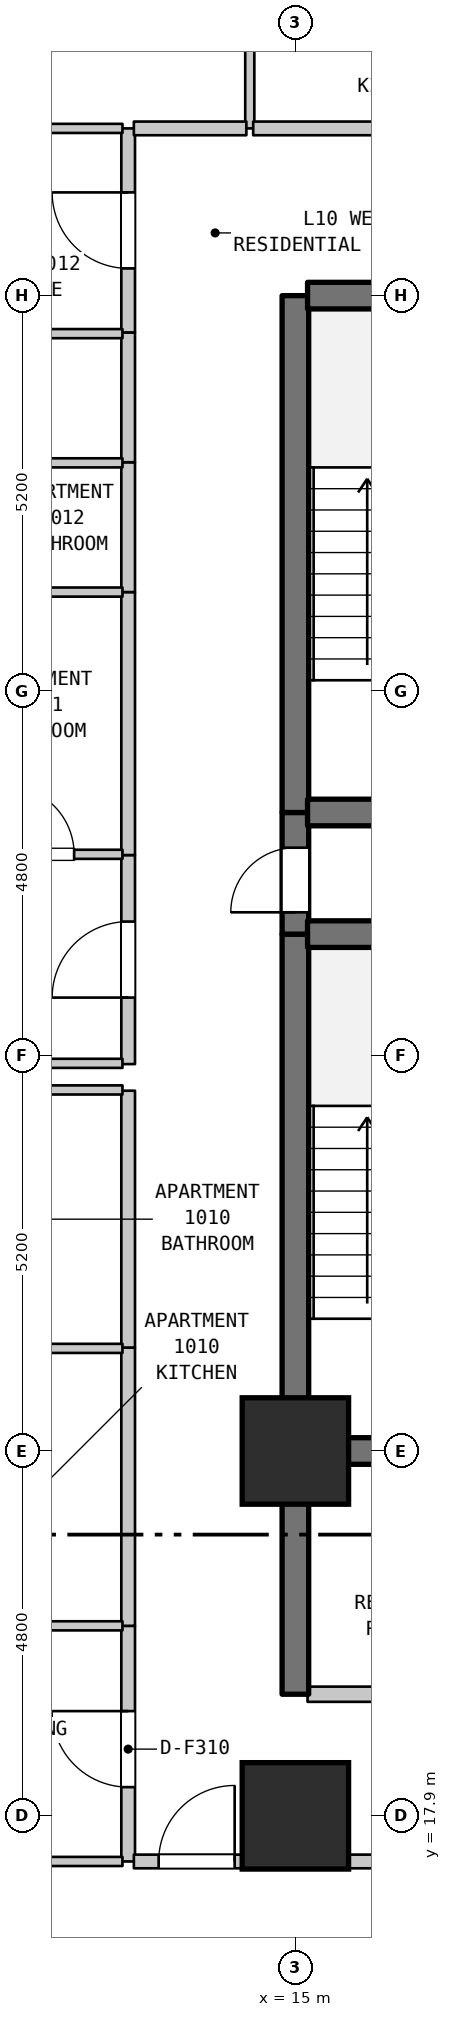
"""IFC4 building model, lengths in metres.
Left out: names, types, materials, properties, quantities, classifications, styles, units other than length and angle.
Written with IfcOpenShell. Run it as: python <this file> out.ifc"""

import sys

from ifc_helpers import new_model, si_unit, direction, frame, frame_2d, origin, origin_2d, place, context, subcontext, project, spatial, rectangle, extrude, element, fill, save


model = new_model("IFC4")
c1 = context("Model", 3, precision=1e-05, world=origin(), true_north=direction((0.0, 1.0)))
c2 = subcontext(c1, "Body", "Model", "MODEL_VIEW")
j1 = project(units=[si_unit("LENGTHUNIT", "METRE"), si_unit("PLANEANGLEUNIT", "RADIAN")], contexts=[c1])
p1 = place(None, origin())
s1 = spatial("IfcSite", under=j1, at=p1, CompositionType="ELEMENT")
p2 = place(p1, origin())
s2 = spatial("IfcBuilding", under=s1, at=p2, CompositionType="ELEMENT")
p3 = place(p2, frame((0.0, 0.0, 46.2)))
s3 = spatial("IfcBuildingStorey", under=s2, at=p3, CompositionType="ELEMENT", Elevation=46.2)
for number, where, z_axis, x_axis in (
    (1, (15.0, 17.9, 0.0), (0.0, 0.0, 1.0), (1.0, 0.0, 0.0)),
    (2, (15.0, 22.7, 0.0), (0.0, 0.0, 1.0), (1.0, 0.0, 0.0)),
):
    element("IfcColumn", number, at=place(p3, frame(where, z_axis=z_axis, x_axis=x_axis)), inside=s3, PredefinedType="COLUMN", context=c2, shape_type="SweptSolid", body=[
        extrude(rectangle(XDim=1.4, YDim=1.4, at=origin_2d()), origin(), (0.0, 0.0, 1.0), 3.7),
    ])
p4 = place(p3, frame((12.8, 17.3, 0.0), z_axis=(0.0, 0.0, 1.0), x_axis=(0.0, 1.0, 0.0)))
e3 = element("IfcWall", 3, at=p4, inside=s3, PredefinedType="STANDARD", context=c2, shape_type="SweptSolid", body=[
    extrude(rectangle(XDim=3.1, YDim=0.18, at=frame_2d((1.55, 0.0))), origin(), (0.0, 0.0, 1.0), 3.385),
])
p5 = place(p4, frame((0.978, 0.0, 0.0)))
e4 = element("IfcOpeningElement", 4, at=p5, cuts=e3, PredefinedType="OPENING", context=c2, shape_type="SweptSolid", body=[
    extrude(rectangle(XDim=1.0, YDim=2.15, at=frame_2d((0.5, 1.075))), frame((0.0, 0.1, 0.0), z_axis=(0.0, -1.0, 0.0), x_axis=(1.0, 0.0, 0.0)), (0.0, 0.0, 1.0), 0.2),
])
p6 = place(p3, frame((12.8, 20.4, 0.0), z_axis=(0.0, 0.0, 1.0), x_axis=(0.0, 1.0, 0.0)))
e5 = element("IfcWall", 5, at=p6, inside=s3, PredefinedType="STANDARD", context=c2, shape_type="SweptSolid", body=[
    extrude(rectangle(XDim=3.661, YDim=0.18, at=frame_2d((1.831, 0.0))), origin(), (0.0, 0.0, 1.0), 3.385),
])
p7 = place(p3, frame((12.8, 24.061, 0.0), z_axis=(0.0, 0.0, 1.0), x_axis=(0.0, 1.0, 0.0)))
e6 = element("IfcWall", 6, at=p7, inside=s3, PredefinedType="STANDARD", context=c2, shape_type="SweptSolid", body=[
    extrude(rectangle(XDim=3.379, YDim=0.18, at=frame_2d((1.689, 0.0))), origin(), (0.0, 0.0, 1.0), 3.385),
])
p8 = place(p3, frame((12.8, 27.79, 0.0), z_axis=(0.0, 0.0, 1.0), x_axis=(0.0, 1.0, 0.0)))
e7 = element("IfcWall", 7, at=p8, inside=s3, PredefinedType="STANDARD", context=c2, shape_type="SweptSolid", body=[
    extrude(rectangle(XDim=2.75, YDim=0.18, at=frame_2d((1.375, 0.0))), origin(), (0.0, 0.0, 1.0), 3.385),
])
p9 = place(p8, frame((0.875, 0.0, 0.0)))
e8 = element("IfcOpeningElement", 8, at=p9, cuts=e7, PredefinedType="OPENING", context=c2, shape_type="SweptSolid", body=[
    extrude(rectangle(XDim=1.0, YDim=2.15, at=frame_2d((0.5, 1.075))), frame((0.0, 0.1, 0.0), z_axis=(0.0, -1.0, 0.0), x_axis=(1.0, 0.0, 0.0)), (0.0, 0.0, 1.0), 0.2),
])
p10 = place(p3, frame((12.8, 30.54, 0.0), z_axis=(0.0, 0.0, 1.0), x_axis=(0.0, 1.0, 0.0)))
e9 = element("IfcWall", 9, at=p10, inside=s3, PredefinedType="STANDARD", context=c2, shape_type="SweptSolid", body=[
    extrude(rectangle(XDim=3.46, YDim=0.18, at=frame_2d((1.73, 0.0))), origin(), (0.0, 0.0, 1.0), 3.385),
])
for number, where, z_axis, x_axis in (
    (10, (12.8, 34.0, 0.0), (0.0, 0.0, 1.0), (0.0, 1.0, 0.0)),
    (11, (12.8, 35.708, 0.0), (0.0, 0.0, 1.0), (0.0, 1.0, 0.0)),
):
    element("IfcWall", number, at=place(p3, frame(where, z_axis=z_axis, x_axis=x_axis)), inside=s3, PredefinedType="STANDARD", context=c2, shape_type="SweptSolid", body=[
        extrude(rectangle(XDim=1.708, YDim=0.18, at=frame_2d((0.854, 0.0))), origin(), (0.0, 0.0, 1.0), 3.385),
    ])
p11 = place(p3, frame((12.8, 37.416, 0.0), z_axis=(0.0, 0.0, 1.0), x_axis=(0.0, 1.0, 0.0)))
e12 = element("IfcWall", 12, at=p11, inside=s3, PredefinedType="STANDARD", context=c2, shape_type="SweptSolid", body=[
    extrude(rectangle(XDim=2.684, YDim=0.18, at=frame_2d((1.342, 0.0))), origin(), (0.0, 0.0, 1.0), 3.385),
])
p12 = place(p11, frame((0.842, 0.0, 0.0)))
e13 = element("IfcOpeningElement", 13, at=p12, cuts=e12, PredefinedType="OPENING", context=c2, shape_type="SweptSolid", body=[
    extrude(rectangle(XDim=1.0, YDim=2.15, at=frame_2d((0.5, 1.075))), frame((0.0, 0.1, 0.0), z_axis=(0.0, -1.0, 0.0), x_axis=(1.0, 0.0, 0.0)), (0.0, 0.0, 1.0), 0.2),
])
p13 = place(p3, frame((14.4, 40.1, 0.0), z_axis=(0.0, 0.0, 1.0), x_axis=(0.0, 1.0, 0.0)))
e14 = element("IfcWall", 14, at=p13, inside=s3, PredefinedType="PARTITIONING", context=c2, shape_type="SweptSolid", body=[
    extrude(rectangle(XDim=2.3, YDim=0.12, at=frame_2d((1.15, 0.0))), origin(), (0.0, 0.0, 1.0), 3.385),
])
p14 = place(p3, frame((15.0, 19.5, 0.0), z_axis=(0.0, 0.0, 1.0), x_axis=(0.0, 1.0, 0.0)))
e15 = element("IfcWall", 15, at=p14, inside=s3, PredefinedType="SHEAR", context=c2, shape_type="SweptSolid", body=[
    extrude(rectangle(XDim=3.2, YDim=0.35, at=frame_2d((1.6, 0.0))), origin(), (0.0, 0.0, 1.0), 3.385),
])
p15 = place(p3, frame((15.0, 22.7, 0.0), z_axis=(0.0, 0.0, 1.0), x_axis=(0.0, 1.0, 0.0)))
e16 = element("IfcWall", 16, at=p15, inside=s3, PredefinedType="SHEAR", context=c2, shape_type="SweptSolid", body=[
    extrude(rectangle(XDim=6.8, YDim=0.35, at=frame_2d((3.4, 0.0))), origin(), (0.0, 0.0, 1.0), 3.385),
])
p16 = place(p3, frame((15.0, 29.5, 0.0), z_axis=(0.0, 0.0, 1.0), x_axis=(0.0, 1.0, 0.0)))
e17 = element("IfcWall", 17, at=p16, inside=s3, PredefinedType="SHEAR", context=c2, shape_type="SweptSolid", body=[
    extrude(rectangle(XDim=1.6, YDim=0.35, at=frame_2d((0.8, 0.0))), origin(), (0.0, 0.0, 1.0), 3.385),
])
p17 = place(p16, frame((0.287, 0.0, 0.0)))
e18 = element("IfcOpeningElement", 18, at=p17, cuts=e17, PredefinedType="OPENING", context=c2, shape_type="SweptSolid", body=[
    extrude(rectangle(XDim=0.85, YDim=2.1, at=frame_2d((0.425, 1.05))), frame((0.0, 0.185, 0.0), z_axis=(0.0, -1.0, 0.0), x_axis=(1.0, 0.0, 0.0)), (0.0, 0.0, 1.0), 0.37),
])
p18 = place(p3, frame((15.0, 31.1, 0.0), z_axis=(0.0, 0.0, 1.0), x_axis=(0.0, 1.0, 0.0)))
e19 = element("IfcWall", 19, at=p18, inside=s3, PredefinedType="SHEAR", context=c2, shape_type="SweptSolid", body=[
    extrude(rectangle(XDim=6.8, YDim=0.35, at=frame_2d((3.4, 0.0))), origin(), (0.0, 0.0, 1.0), 3.385),
])
p19 = place(p3, frame((9.085, 17.3, 0.0), z_axis=(0.0, 0.0, 1.0), x_axis=(1.0, 0.0, 0.0)))
e20 = element("IfcWall", 20, at=p19, inside=s3, PredefinedType="PARTITIONING", context=c2, shape_type="SweptSolid", body=[
    extrude(rectangle(XDim=3.64, YDim=0.12, at=frame_2d((1.82, 0.0))), origin(), (0.0, 0.0, 1.0), 3.385),
])
p20 = place(p3, frame((12.875, 17.3, 0.0), z_axis=(0.0, 0.0, 1.0), x_axis=(1.0, 0.0, 0.0)))
e21 = element("IfcWall", 21, at=p20, inside=s3, PredefinedType="STANDARD", context=c2, shape_type="SweptSolid", body=[
    extrude(rectangle(XDim=3.28, YDim=0.18, at=frame_2d((1.64, 0.0))), origin(), (0.0, 0.0, 1.0), 3.385),
])
p21 = place(p20, frame((0.326, 0.0, 0.0)))
e22 = element("IfcOpeningElement", 22, at=p21, cuts=e21, PredefinedType="OPENING", context=c2, shape_type="SweptSolid", body=[
    extrude(rectangle(XDim=1.0, YDim=2.15, at=frame_2d((0.5, 1.075))), frame((0.0, 0.1, 0.0), z_axis=(0.0, -1.0, 0.0), x_axis=(1.0, 0.0, 0.0)), (0.0, 0.0, 1.0), 0.2),
])
p22 = place(p3, frame((15.16, 19.5, 0.0), z_axis=(0.0, 0.0, 1.0), x_axis=(1.0, 0.0, 0.0)))
e23 = element("IfcWall", 23, at=p22, inside=s3, PredefinedType="STANDARD", context=c2, shape_type="SweptSolid", body=[
    extrude(rectangle(XDim=3.68, YDim=0.2, at=frame_2d((1.84, 0.0))), origin(), (0.0, 0.0, 1.0), 3.385),
])
p23 = place(p22, frame((1.39, 0.0, 0.0)))
e24 = element("IfcOpeningElement", 24, at=p23, cuts=e23, PredefinedType="OPENING", context=c2, shape_type="SweptSolid", body=[
    extrude(rectangle(XDim=0.9, YDim=2.15, at=frame_2d((0.45, 1.075))), frame((0.0, 0.11, 0.0), z_axis=(0.0, -1.0, 0.0), x_axis=(1.0, 0.0, 0.0)), (0.0, 0.0, 1.0), 0.22),
])
p24 = place(p3, frame((10.595, 20.4, 0.0), z_axis=(0.0, 0.0, 1.0), x_axis=(1.0, 0.0, 0.0)))
e25 = element("IfcWall", 25, at=p24, inside=s3, PredefinedType="PARTITIONING", context=c2, shape_type="SweptSolid", body=[
    extrude(rectangle(XDim=2.13, YDim=0.12, at=frame_2d((1.065, 0.0))), origin(), (0.0, 0.0, 1.0), 3.385),
])
p25 = place(p3, frame((15.16, 22.7, 0.0), z_axis=(0.0, 0.0, 1.0), x_axis=(1.0, 0.0, 0.0)))
e26 = element("IfcWall", 26, at=p25, inside=s3, PredefinedType="SHEAR", context=c2, shape_type="SweptSolid", body=[
    extrude(rectangle(XDim=3.68, YDim=0.35, at=frame_2d((1.84, 0.0))), origin(), (0.0, 0.0, 1.0), 3.385),
])
for number, where, z_axis, x_axis in (
    (27, (10.595, 24.05, 0.0), (0.0, 0.0, 1.0), (1.0, 0.0, 0.0)),
    (28, (10.595, 27.45, 0.0), (0.0, 0.0, 1.0), (1.0, 0.0, 0.0)),
):
    element("IfcWall", number, at=place(p3, frame(where, z_axis=z_axis, x_axis=x_axis)), inside=s3, PredefinedType="PARTITIONING", context=c2, shape_type="SweptSolid", body=[
        extrude(rectangle(XDim=2.13, YDim=0.12, at=frame_2d((1.065, 0.0))), origin(), (0.0, 0.0, 1.0), 3.385),
    ])
p26 = place(p3, frame((9.03, 27.8, 0.0), z_axis=(0.0, 0.0, 1.0), x_axis=(1.0, 0.0, 0.0)))
e29 = element("IfcWall", 29, at=p26, inside=s3, PredefinedType="PARTITIONING", context=c2, shape_type="SweptSolid", body=[
    extrude(rectangle(XDim=3.695, YDim=0.12, at=frame_2d((1.848, 0.0))), origin(), (0.0, 0.0, 1.0), 3.385),
])
p27 = place(p3, frame((15.16, 29.5, 0.0), z_axis=(0.0, 0.0, 1.0), x_axis=(1.0, 0.0, 0.0)))
e30 = element("IfcWall", 30, at=p27, inside=s3, PredefinedType="SHEAR", context=c2, shape_type="SweptSolid", body=[
    extrude(rectangle(XDim=3.68, YDim=0.35, at=frame_2d((1.84, 0.0))), origin(), (0.0, 0.0, 1.0), 3.385),
])
p28 = place(p3, frame((10.523, 30.55, 0.0), z_axis=(0.0, 0.0, 1.0), x_axis=(1.0, 0.0, 0.0)))
e31 = element("IfcWall", 31, at=p28, inside=s3, PredefinedType="PARTITIONING", context=c2, shape_type="SweptSolid", body=[
    extrude(rectangle(XDim=2.202, YDim=0.12, at=frame_2d((1.101, 0.0))), origin(), (0.0, 0.0, 1.0), 3.385),
])
p29 = place(p28, frame((0.666, 0.0, 0.0)))
e32 = element("IfcOpeningElement", 32, at=p29, cuts=e31, PredefinedType="OPENING", context=c2, shape_type="SweptSolid", body=[
    extrude(rectangle(XDim=0.9, YDim=2.1, at=frame_2d((0.45, 1.05))), frame((0.0, 0.07, 0.0), z_axis=(0.0, -1.0, 0.0), x_axis=(1.0, 0.0, 0.0)), (0.0, 0.0, 1.0), 0.14),
])
p30 = place(p3, frame((15.16, 31.1, 0.0), z_axis=(0.0, 0.0, 1.0), x_axis=(1.0, 0.0, 0.0)))
e33 = element("IfcWall", 33, at=p30, inside=s3, PredefinedType="SHEAR", context=c2, shape_type="SweptSolid", body=[
    extrude(rectangle(XDim=3.68, YDim=0.35, at=frame_2d((1.84, 0.0))), origin(), (0.0, 0.0, 1.0), 3.385),
])
for number, where, z_axis, x_axis in (
    (34, (10.545, 34.0, 0.0), (0.0, 0.0, 1.0), (1.0, 0.0, 0.0)),
    (35, (10.545, 35.7, 0.0), (0.0, 0.0, 1.0), (1.0, 0.0, 0.0)),
    (36, (10.545, 37.4, 0.0), (0.0, 0.0, 1.0), (1.0, 0.0, 0.0)),
):
    element("IfcWall", number, at=place(p3, frame(where, z_axis=z_axis, x_axis=x_axis)), inside=s3, PredefinedType="PARTITIONING", context=c2, shape_type="SweptSolid", body=[
        extrude(rectangle(XDim=2.18, YDim=0.12, at=frame_2d((1.09, 0.0))), origin(), (0.0, 0.0, 1.0), 3.385),
    ])
p31 = place(p3, frame((15.16, 37.9, 0.0), z_axis=(0.0, 0.0, 1.0), x_axis=(1.0, 0.0, 0.0)))
e37 = element("IfcWall", 37, at=p31, inside=s3, PredefinedType="SHEAR", context=c2, shape_type="SweptSolid", body=[
    extrude(rectangle(XDim=3.68, YDim=0.35, at=frame_2d((1.84, 0.0))), origin(), (0.0, 0.0, 1.0), 3.385),
])
p32 = place(p3, frame((9.702, 40.1, 0.0), z_axis=(0.0, 0.0, 1.0), x_axis=(1.0, 0.0, 0.0)))
e38 = element("IfcWall", 38, at=p32, inside=s3, PredefinedType="PARTITIONING", context=c2, shape_type="SweptSolid", body=[
    extrude(rectangle(XDim=3.023, YDim=0.12, at=frame_2d((1.512, 0.0))), origin(), (0.0, 0.0, 1.0), 3.385),
])
p33 = place(p3, frame((12.875, 40.1, 0.0), z_axis=(0.0, 0.0, 1.0), x_axis=(1.0, 0.0, 0.0)))
e39 = element("IfcWall", 39, at=p33, inside=s3, PredefinedType="STANDARD", context=c2, shape_type="SweptSolid", body=[
    extrude(rectangle(XDim=1.48, YDim=0.18, at=frame_2d((0.74, 0.0))), origin(), (0.0, 0.0, 1.0), 3.385),
])
p34 = place(p3, frame((14.445, 40.1, 0.0), z_axis=(0.0, 0.0, 1.0), x_axis=(1.0, 0.0, 0.0)))
e40 = element("IfcWall", 40, at=p34, inside=s3, PredefinedType="STANDARD", context=c2, shape_type="SweptSolid", body=[
    extrude(rectangle(XDim=2.96, YDim=0.18, at=frame_2d((1.48, 0.0))), origin(), (0.0, 0.0, 1.0), 3.385),
])
p35 = place(p5, origin())
e41 = element("IfcDoor", 41, at=p35, inside=s3, OperationType="SINGLE_SWING_RIGHT", PredefinedType="DOOR", context=c2, shape_type="SweptSolid", body=[
    extrude(rectangle(XDim=1.0, YDim=2.15, at=frame_2d((0.5, 1.075))), frame((0.0, 0.025, 0.0), z_axis=(0.0, -1.0, 0.0), x_axis=(1.0, 0.0, 0.0)), (0.0, 0.0, 1.0), 0.05),
])
fill(e4, e41)
p36 = place(p9, origin())
e42 = element("IfcDoor", 42, at=p36, inside=s3, OperationType="SINGLE_SWING_LEFT", PredefinedType="DOOR", context=c2, shape_type="SweptSolid", body=[
    extrude(rectangle(XDim=1.0, YDim=2.15, at=frame_2d((0.5, 1.075))), frame((0.0, 0.025, 0.0), z_axis=(0.0, -1.0, 0.0), x_axis=(1.0, 0.0, 0.0)), (0.0, 0.0, 1.0), 0.05),
])
fill(e8, e42)
p37 = place(p12, origin())
e43 = element("IfcDoor", 43, at=p37, inside=s3, OperationType="SINGLE_SWING_RIGHT", PredefinedType="DOOR", context=c2, shape_type="SweptSolid", body=[
    extrude(rectangle(XDim=1.0, YDim=2.15, at=frame_2d((0.5, 1.075))), frame((0.0, 0.025, 0.0), z_axis=(0.0, -1.0, 0.0), x_axis=(1.0, 0.0, 0.0)), (0.0, 0.0, 1.0), 0.05),
])
fill(e13, e43)
p38 = place(p17, origin())
e44 = element("IfcDoor", 44, at=p38, inside=s3, OperationType="SINGLE_SWING_LEFT", PredefinedType="DOOR", context=c2, shape_type="SweptSolid", body=[
    extrude(rectangle(XDim=0.85, YDim=2.1, at=frame_2d((0.425, 1.05))), frame((0.0, 0.025, 0.0), z_axis=(0.0, -1.0, 0.0), x_axis=(1.0, 0.0, 0.0)), (0.0, 0.0, 1.0), 0.05),
])
fill(e18, e44)
p39 = place(p21, origin())
e45 = element("IfcDoor", 45, at=p39, inside=s3, OperationType="SINGLE_SWING_RIGHT", PredefinedType="DOOR", context=c2, shape_type="SweptSolid", body=[
    extrude(rectangle(XDim=1.0, YDim=2.15, at=frame_2d((0.5, 1.075))), frame((0.0, 0.025, 0.0), z_axis=(0.0, -1.0, 0.0), x_axis=(1.0, 0.0, 0.0)), (0.0, 0.0, 1.0), 0.05),
])
fill(e22, e45)
p40 = place(p29, origin())
e46 = element("IfcDoor", 46, at=p40, inside=s3, OperationType="SINGLE_SWING_LEFT", PredefinedType="DOOR", context=c2, shape_type="SweptSolid", body=[
    extrude(rectangle(XDim=0.9, YDim=2.1, at=frame_2d((0.45, 1.05))), frame((0.0, 0.025, 0.0), z_axis=(0.0, -1.0, 0.0), x_axis=(1.0, 0.0, 0.0)), (0.0, 0.0, 1.0), 0.05),
])
fill(e32, e46)
save(model, sys.argv[1])
